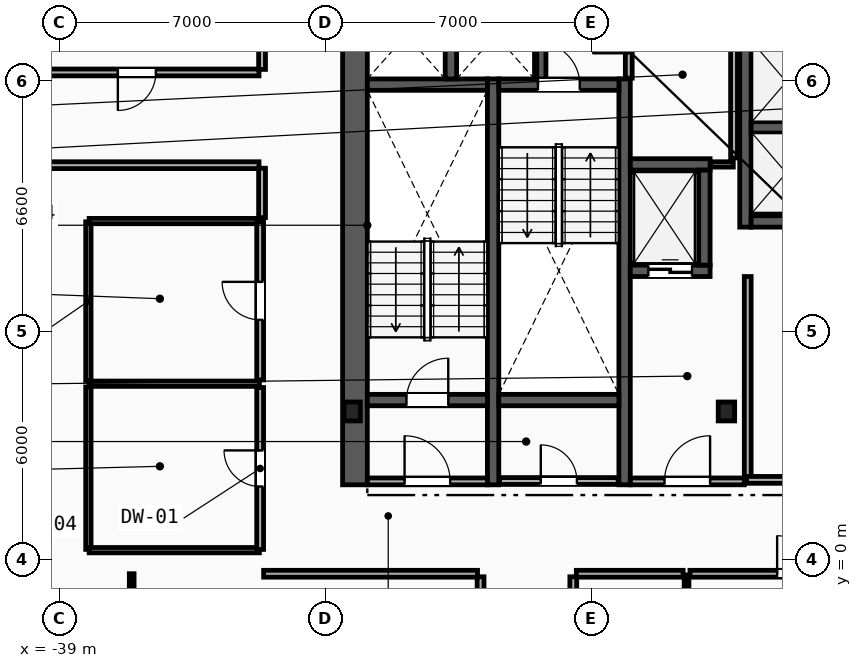
"""IFC4 building model, lengths in metres.
Left out: names, types, materials, properties, quantities, classifications, styles, units other than length and angle.
Written with IfcOpenShell. Run it as: python <this file> out.ifc"""

import sys

from ifc_helpers import new_model, si_unit, direction, frame, frame_2d, origin, origin_2d, place, context, subcontext, project, spatial, rectangle, i_section, extrude, element, fill, save


model = new_model("IFC4")
c1 = context("Model", 3, precision=1e-05, world=origin(), true_north=direction((0.0, 1.0)))
c2 = subcontext(c1, "Body", "Model", "MODEL_VIEW")
j1 = project(units=[si_unit("LENGTHUNIT", "METRE"), si_unit("PLANEANGLEUNIT", "RADIAN")], contexts=[c1])
p1 = place(None, origin())
s1 = spatial("IfcSite", under=j1, at=p1, CompositionType="ELEMENT")
p2 = place(p1, origin())
s2 = spatial("IfcBuilding", under=s1, at=p2, CompositionType="ELEMENT")
p3 = place(p2, frame((0.0, 0.0, 140.4)))
s3 = spatial("IfcBuildingStorey", under=s2, at=p3, CompositionType="ELEMENT", Elevation=140.4)
for number, where, z_axis, x_axis in (
    (1, (-31.3, 3.9, 0.0), (0.0, 0.0, 1.0), (1.0, 0.0, 0.0)),
    (2, (-21.45, 3.9, 0.0), (0.0, 0.0, 1.0), (1.0, 0.0, 0.0)),
):
    element("IfcColumn", number, at=place(p3, frame(where, z_axis=z_axis, x_axis=x_axis)), inside=s3, PredefinedType="COLUMN", context=c2, shape_type="SweptSolid", body=[
        extrude(i_section(OverallWidth=0.432, OverallDepth=0.498, WebThickness=0.056, FlangeThickness=0.089, FilletRadius=0.018, at=origin_2d()), origin(), (0.0, 0.0, 1.0), 3.6),
    ])
p4 = place(p3, frame((-31.225, 1.97, 0.0), z_axis=(0.0, 0.0, 1.0), x_axis=(0.0, 1.0, 0.0)))
e3 = element("IfcWall", 3, at=p4, inside=s3, PredefinedType="SHEAR", context=c2, shape_type="SweptSolid", body=[
    extrude(rectangle(XDim=13.33, YDim=0.65, at=frame_2d((6.665, 0.0))), origin(), (0.0, 0.0, 1.0), 3.36),
])
for number, where, z_axis, x_axis in (
    (4, (-27.59, 1.97, 0.0), (0.0, 0.0, 1.0), (0.0, 1.0, 0.0)),
    (5, (-24.13, 1.97, 0.0), (0.0, 0.0, 1.0), (0.0, 1.0, 0.0)),
):
    element("IfcWall", number, at=place(p3, frame(where, z_axis=z_axis, x_axis=x_axis)), inside=s3, PredefinedType="SHEAR", context=c2, shape_type="SweptSolid", body=[
        extrude(rectangle(XDim=10.68, YDim=0.3, at=frame_2d((5.34, 0.0))), origin(), (0.0, 0.0, 1.0), 3.36),
    ])
p5 = place(p3, frame((-30.9, 4.2, 0.0), z_axis=(0.0, 0.0, 1.0), x_axis=(1.0, 0.0, 0.0)))
e6 = element("IfcWall", 6, at=p5, inside=s3, PredefinedType="SHEAR", context=c2, shape_type="SweptSolid", body=[
    extrude(rectangle(XDim=3.16, YDim=0.3, at=frame_2d((1.58, 0.0))), origin(), (0.0, 0.0, 1.0), 3.36),
])
p6 = place(p5, frame((1.03, 0.0, 0.0)))
e7 = element("IfcOpeningElement", 7, at=p6, cuts=e6, PredefinedType="OPENING", context=c2, shape_type="SweptSolid", body=[
    extrude(rectangle(XDim=1.1, YDim=2.15, at=frame_2d((0.55, 1.075))), frame((0.0, 0.16, 0.0), z_axis=(0.0, -1.0, 0.0), x_axis=(1.0, 0.0, 0.0)), (0.0, 0.0, 1.0), 0.32),
])
p7 = place(p3, frame((-30.9, 12.5, 0.0), z_axis=(0.0, 0.0, 1.0), x_axis=(1.0, 0.0, 0.0)))
e8 = element("IfcWall", 8, at=p7, inside=s3, PredefinedType="SHEAR", context=c2, shape_type="SweptSolid", body=[
    extrude(rectangle(XDim=3.16, YDim=0.3, at=frame_2d((1.58, 0.0))), origin(), (0.0, 0.0, 1.0), 3.36),
])
p8 = place(p3, frame((-27.44, 12.5, 0.0), z_axis=(0.0, 0.0, 1.0), x_axis=(1.0, 0.0, 0.0)))
e9 = element("IfcWall", 9, at=p8, inside=s3, PredefinedType="SHEAR", context=c2, shape_type="SweptSolid", body=[
    extrude(rectangle(XDim=3.16, YDim=0.3, at=frame_2d((1.58, 0.0))), origin(), (0.0, 0.0, 1.0), 3.36),
])
p9 = place(p8, frame((1.03, 0.0, 0.0)))
e10 = element("IfcOpeningElement", 10, at=p9, cuts=e9, PredefinedType="OPENING", context=c2, shape_type="SweptSolid", body=[
    extrude(rectangle(XDim=1.1, YDim=2.15, at=frame_2d((0.55, 1.075))), frame((0.0, 0.16, 0.0), z_axis=(0.0, -1.0, 0.0), x_axis=(1.0, 0.0, 0.0)), (0.0, 0.0, 1.0), 0.32),
])
p10 = place(p3, frame((-27.44, 4.2, 0.0), z_axis=(0.0, 0.0, 1.0), x_axis=(1.0, 0.0, 0.0)))
e11 = element("IfcWall", 11, at=p10, inside=s3, PredefinedType="SHEAR", context=c2, shape_type="SweptSolid", body=[
    extrude(rectangle(XDim=3.16, YDim=0.3, at=frame_2d((1.58, 0.0))), origin(), (0.0, 0.0, 1.0), 3.36),
])
p11 = place(p3, frame((-20.89, 2.15, 0.0), z_axis=(0.0, 0.0, 1.0), x_axis=(0.0, 1.0, 0.0)))
e12 = element("IfcWall", 12, at=p11, inside=s3, PredefinedType="PARTITIONING", context=c2, shape_type="SweptSolid", body=[
    extrude(rectangle(XDim=5.3, YDim=0.18, at=frame_2d((2.65, 0.0))), origin(), (0.0, 0.0, 1.0), 3.36),
])
p12 = place(p3, frame((-23.98, 2.06, 0.0), z_axis=(0.0, 0.0, 1.0), x_axis=(1.0, 0.0, 0.0)))
e13 = element("IfcWall", 13, at=p12, inside=s3, PredefinedType="PARTITIONING", context=c2, shape_type="SweptSolid", body=[
    extrude(rectangle(XDim=3.0, YDim=0.18, at=frame_2d((1.5, 0.0))), origin(), (0.0, 0.0, 1.0), 3.36),
])
p13 = place(p12, frame((0.9, 0.0, 0.0)))
e14 = element("IfcOpeningElement", 14, at=p13, cuts=e13, PredefinedType="OPENING", context=c2, shape_type="SweptSolid", body=[
    extrude(rectangle(XDim=1.2, YDim=2.15, at=frame_2d((0.6, 1.075))), frame((0.0, 0.1, 0.0), z_axis=(0.0, -1.0, 0.0), x_axis=(1.0, 0.0, 0.0)), (0.0, 0.0, 1.0), 0.2),
])
p14 = place(p3, frame((-30.9, 2.06, 0.0), z_axis=(0.0, 0.0, 1.0), x_axis=(1.0, 0.0, 0.0)))
e15 = element("IfcWall", 15, at=p14, inside=s3, PredefinedType="PARTITIONING", context=c2, shape_type="SweptSolid", body=[
    extrude(rectangle(XDim=3.16, YDim=0.18, at=frame_2d((1.58, 0.0))), origin(), (0.0, 0.0, 1.0), 3.36),
])
p15 = place(p14, frame((0.98, 0.0, 0.0)))
e16 = element("IfcOpeningElement", 16, at=p15, cuts=e15, PredefinedType="OPENING", context=c2, shape_type="SweptSolid", body=[
    extrude(rectangle(XDim=1.2, YDim=2.15, at=frame_2d((0.6, 1.075))), frame((0.0, 0.1, 0.0), z_axis=(0.0, -1.0, 0.0), x_axis=(1.0, 0.0, 0.0)), (0.0, 0.0, 1.0), 0.2),
])
p16 = place(p3, frame((-23.98, 7.6, 0.0), z_axis=(0.0, 0.0, 1.0), x_axis=(1.0, 0.0, 0.0)))
e17 = element("IfcWall", 17, at=p16, inside=s3, PredefinedType="SHEAR", context=c2, shape_type="SweptSolid", body=[
    extrude(rectangle(XDim=2.1, YDim=0.3, at=frame_2d((1.05, 0.0))), origin(), (0.0, 0.0, 1.0), 3.36),
])
p17 = place(p16, frame((0.475, 0.0, 0.0)))
e18 = element("IfcOpeningElement", 18, at=p17, cuts=e17, PredefinedType="OPENING", context=c2, shape_type="SweptSolid", body=[
    extrude(rectangle(XDim=1.15, YDim=2.2, at=frame_2d((0.575, 1.1))), frame((0.0, 0.16, 0.0), z_axis=(0.0, -1.0, 0.0), x_axis=(1.0, 0.0, 0.0)), (0.0, 0.0, 1.0), 0.32),
])
p18 = place(p3, frame((-23.98, 10.4, 0.0), z_axis=(0.0, 0.0, 1.0), x_axis=(1.0, 0.0, 0.0)))
e19 = element("IfcWall", 19, at=p18, inside=s3, PredefinedType="SHEAR", context=c2, shape_type="SweptSolid", body=[
    extrude(rectangle(XDim=2.1, YDim=0.3, at=frame_2d((1.05, 0.0))), origin(), (0.0, 0.0, 1.0), 3.36),
])
p19 = place(p3, frame((-22.03, 7.75, 0.0), z_axis=(0.0, 0.0, 1.0), x_axis=(0.0, 1.0, 0.0)))
e20 = element("IfcWall", 20, at=p19, inside=s3, PredefinedType="SHEAR", context=c2, shape_type="SweptSolid", body=[
    extrude(rectangle(XDim=2.5, YDim=0.3, at=frame_2d((1.25, 0.0))), origin(), (0.0, 0.0, 1.0), 3.36),
])
for number, where, z_axis, x_axis in (
    (21, (-28.7, 12.65, 0.0), (0.0, 0.0, 1.0), (0.0, 1.0, 0.0)),
    (22, (-26.35, 12.65, 0.0), (0.0, 0.0, 1.0), (0.0, 1.0, 0.0)),
):
    element("IfcWall", number, at=place(p3, frame(where, z_axis=z_axis, x_axis=x_axis)), inside=s3, PredefinedType="SHEAR", context=c2, shape_type="SweptSolid", body=[
        extrude(rectangle(XDim=2.3, YDim=0.3, at=frame_2d((1.15, 0.0))), origin(), (0.0, 0.0, 1.0), 3.36),
    ])
p20 = place(p3, frame((-20.95, 8.75, 0.0), z_axis=(0.0, 0.0, 1.0), x_axis=(0.0, 1.0, 0.0)))
e23 = element("IfcWall", 23, at=p20, inside=s3, PredefinedType="SHEAR", context=c2, shape_type="SweptSolid", body=[
    extrude(rectangle(XDim=5.25, YDim=0.3, at=frame_2d((2.625, 0.0))), origin(), (0.0, 0.0, 1.0), 3.36),
])
p21 = place(p3, frame((-20.8, 8.9, 0.0), z_axis=(0.0, 0.0, 1.0), x_axis=(1.0, 0.0, 0.0)))
e24 = element("IfcWall", 24, at=p21, inside=s3, PredefinedType="SHEAR", context=c2, shape_type="SweptSolid", body=[
    extrude(rectangle(XDim=2.15, YDim=0.3, at=frame_2d((1.075, 0.0))), origin(), (0.0, 0.0, 1.0), 3.36),
])
p22 = place(p3, frame((-20.8, 11.375, 0.0), z_axis=(0.0, 0.0, 1.0), x_axis=(1.0, 0.0, 0.0)))
e25 = element("IfcWall", 25, at=p22, inside=s3, PredefinedType="SHEAR", context=c2, shape_type="SweptSolid", body=[
    extrude(rectangle(XDim=1.85, YDim=0.3, at=frame_2d((0.925, 0.0))), origin(), (0.0, 0.0, 1.0), 3.36),
])
p23 = place(p3, frame((-21.86, 10.4, 0.0), z_axis=(0.0, 0.0, 1.0), x_axis=(1.0, 0.0, 0.0)))
e26 = element("IfcWall", 26, at=p23, inside=s3, PredefinedType="PARTITIONING", context=c2, shape_type="SweptSolid", body=[
    extrude(rectangle(XDim=0.59, YDim=0.14, at=frame_2d((0.295, 0.0))), origin(), (0.0, 0.0, 1.0), 3.36),
])
p24 = place(p3, frame((-21.25, 10.57, 0.0), z_axis=(0.0, 0.0, 1.0), x_axis=(0.0, 1.0, 0.0)))
e27 = element("IfcWall", 27, at=p24, inside=s3, PredefinedType="PARTITIONING", context=c2, shape_type="SweptSolid", body=[
    extrude(rectangle(XDim=4.36, YDim=0.18, at=frame_2d((2.18, 0.0))), origin(), (0.0, 0.0, 1.0), 3.36),
])
p25 = place(p3, frame((-27.42, 2.07, 0.0), z_axis=(0.0, 0.0, 1.0), x_axis=(1.0, 0.0, 0.0)))
e28 = element("IfcWall", 28, at=p25, inside=s3, PredefinedType="PARTITIONING", context=c2, shape_type="SweptSolid", body=[
    extrude(rectangle(XDim=3.12, YDim=0.18, at=frame_2d((1.56, 0.0))), origin(), (0.0, 0.0, 1.0), 3.36),
])
p26 = place(p25, frame((1.085, 0.0, 0.0)))
e29 = element("IfcOpeningElement", 29, at=p26, cuts=e28, PredefinedType="OPENING", context=c2, shape_type="SweptSolid", body=[
    extrude(rectangle(XDim=0.95, YDim=2.1, at=frame_2d((0.475, 1.05))), frame((0.0, 0.1, 0.0), z_axis=(0.0, -1.0, 0.0), x_axis=(1.0, 0.0, 0.0)), (0.0, 0.0, 1.0), 0.2),
])
p27 = place(p3, frame((-24.02, 12.67, 0.0), z_axis=(0.0, 0.0, 1.0), x_axis=(0.0, 1.0, 0.0)))
e30 = element("IfcWall", 30, at=p27, inside=s3, PredefinedType="PARTITIONING", context=c2, shape_type="SweptSolid", body=[
    extrude(rectangle(XDim=2.26, YDim=0.18, at=frame_2d((1.13, 0.0))), origin(), (0.0, 0.0, 1.0), 3.36),
])
p28 = place(p27, frame((0.655, 0.0, 0.0)))
e31 = element("IfcOpeningElement", 31, at=p28, cuts=e30, PredefinedType="OPENING", context=c2, shape_type="SweptSolid", body=[
    extrude(rectangle(XDim=0.95, YDim=2.1, at=frame_2d((0.475, 1.05))), frame((0.0, 0.1, 0.0), z_axis=(0.0, -1.0, 0.0), x_axis=(1.0, 0.0, 0.0)), (0.0, 0.0, 1.0), 0.2),
])
p29 = place(p3, frame((-38.24, 0.27, 0.0), z_axis=(0.0, 0.0, 1.0), x_axis=(0.0, 1.0, 0.0)))
e32 = element("IfcWall", 32, at=p29, inside=s3, PredefinedType="PARTITIONING", context=c2, shape_type="SweptSolid", body=[
    extrude(rectangle(XDim=4.275, YDim=0.14, at=frame_2d((2.137, 0.0))), origin(), (0.0, 0.0, 1.0), 3.36),
])
p30 = place(p3, frame((-38.24, 4.715, 0.0), z_axis=(0.0, 0.0, 1.0), x_axis=(0.0, 1.0, 0.0)))
e33 = element("IfcWall", 33, at=p30, inside=s3, PredefinedType="PARTITIONING", context=c2, shape_type="SweptSolid", body=[
    extrude(rectangle(XDim=4.175, YDim=0.14, at=frame_2d((2.087, 0.0))), origin(), (0.0, 0.0, 1.0), 3.36),
])
for number, where, z_axis, x_axis in (
    (34, (-38.22, 0.25, 0.0), (0.0, 0.0, 1.0), (1.0, 0.0, 0.0)),
    (35, (-38.22, 4.63, 0.0), (0.0, 0.0, 1.0), (1.0, 0.0, 0.0)),
    (36, (-38.22, 8.91, 0.0), (0.0, 0.0, 1.0), (1.0, 0.0, 0.0)),
):
    element("IfcWall", number, at=place(p3, frame(where, z_axis=z_axis, x_axis=x_axis)), inside=s3, PredefinedType="PARTITIONING", context=c2, shape_type="SweptSolid", body=[
        extrude(rectangle(XDim=4.48, YDim=0.14, at=frame_2d((2.24, 0.0))), origin(), (0.0, 0.0, 1.0), 3.36),
    ])
p31 = place(p3, frame((-33.72, 0.27, 0.0), z_axis=(0.0, 0.0, 1.0), x_axis=(0.0, 1.0, 0.0)))
e37 = element("IfcWall", 37, at=p31, inside=s3, PredefinedType="PARTITIONING", context=c2, shape_type="SweptSolid", body=[
    extrude(rectangle(XDim=4.26, YDim=0.18, at=frame_2d((2.13, 0.0))), origin(), (0.0, 0.0, 1.0), 3.36),
])
p32 = place(p31, frame((1.655, 0.0, 0.0)))
e38 = element("IfcOpeningElement", 38, at=p32, cuts=e37, PredefinedType="OPENING", context=c2, shape_type="SweptSolid", body=[
    extrude(rectangle(XDim=0.95, YDim=2.1, at=frame_2d((0.475, 1.05))), frame((0.0, 0.1, 0.0), z_axis=(0.0, -1.0, 0.0), x_axis=(1.0, 0.0, 0.0)), (0.0, 0.0, 1.0), 0.2),
])
p33 = place(p3, frame((-33.72, 4.73, 0.0), z_axis=(0.0, 0.0, 1.0), x_axis=(0.0, 1.0, 0.0)))
e39 = element("IfcWall", 39, at=p33, inside=s3, PredefinedType="PARTITIONING", context=c2, shape_type="SweptSolid", body=[
    extrude(rectangle(XDim=4.16, YDim=0.18, at=frame_2d((2.08, 0.0))), origin(), (0.0, 0.0, 1.0), 3.36),
])
p34 = place(p33, frame((1.58, 0.0, 0.0)))
e40 = element("IfcOpeningElement", 40, at=p34, cuts=e39, PredefinedType="OPENING", context=c2, shape_type="SweptSolid", body=[
    extrude(rectangle(XDim=1.0, YDim=2.15, at=frame_2d((0.5, 1.075))), frame((0.0, 0.1, 0.0), z_axis=(0.0, -1.0, 0.0), x_axis=(1.0, 0.0, 0.0)), (0.0, 0.0, 1.0), 0.2),
])
p35 = place(p3, frame((-37.1, -22.736, 0.0), z_axis=(0.0, 0.0, 1.0), x_axis=(0.0, 1.0, 0.0)))
e41 = element("IfcWall", 41, at=p35, inside=s3, PredefinedType="PARTITIONING", context=c2, shape_type="SweptSolid", body=[
    extrude(rectangle(XDim=22.366, YDim=0.125, at=frame_2d((11.183, 0.0))), origin(), (0.0, 0.0, 1.0), 3.36),
])
p36 = place(p3, frame((-22.5, -20.923, 0.0), z_axis=(0.0, 0.0, 1.0), x_axis=(0.0, 1.0, 0.0)))
e42 = element("IfcWall", 42, at=p36, inside=s3, PredefinedType="PARTITIONING", context=c2, shape_type="SweptSolid", body=[
    extrude(rectangle(XDim=20.523, YDim=0.125, at=frame_2d((10.262, 0.0))), origin(), (0.0, 0.0, 1.0), 2.665),
])
p37 = place(p3, frame((-27.92, -0.45, 0.0), z_axis=(0.0, 0.0, 1.0), x_axis=(0.0, -1.0, 0.0)))
e43 = element("IfcWall", 43, at=p37, inside=s3, PredefinedType="PARTITIONING", context=c2, shape_type="SweptSolid", body=[
    extrude(rectangle(XDim=10.729, YDim=0.18, at=frame_2d((5.364, 0.0))), origin(), (0.0, 0.0, 1.0), 3.36),
])
p38 = place(p37, frame((4.864, 0.0, 0.0)))
e44 = element("IfcOpeningElement", 44, at=p38, cuts=e43, PredefinedType="OPENING", context=c2, shape_type="SweptSolid", body=[
    extrude(rectangle(XDim=1.0, YDim=2.15, at=frame_2d((0.5, 1.075))), frame((0.0, 0.1, 0.0), z_axis=(0.0, -1.0, 0.0), x_axis=(1.0, 0.0, 0.0)), (0.0, 0.0, 1.0), 0.2),
])
p39 = place(p3, frame((-25.48, -11.178, 0.0), z_axis=(0.0, 0.0, 1.0), x_axis=(0.0, 1.0, 0.0)))
e45 = element("IfcWall", 45, at=p39, inside=s3, PredefinedType="PARTITIONING", context=c2, shape_type="SweptSolid", body=[
    extrude(rectangle(XDim=10.729, YDim=0.18, at=frame_2d((5.364, 0.0))), origin(), (0.0, 0.0, 1.0), 3.36),
])
p40 = place(p3, frame((-40.178, 10.38, 0.0), z_axis=(0.0, 0.0, 1.0), x_axis=(1.0, 0.0, 0.0)))
e46 = element("IfcWall", 46, at=p40, inside=s3, PredefinedType="PARTITIONING", context=c2, shape_type="SweptSolid", body=[
    extrude(rectangle(XDim=6.428, YDim=0.18, at=frame_2d((3.214, 0.0))), origin(), (0.0, 0.0, 1.0), 3.36),
])
p41 = place(p3, frame((-33.628, -0.37, 0.0), z_axis=(0.0, 0.0, 1.0), x_axis=(1.0, 0.0, 0.0)))
e47 = element("IfcWall", 47, at=p41, inside=s3, PredefinedType="PARTITIONING", context=c2, shape_type="SweptSolid", body=[
    extrude(rectangle(XDim=5.628, YDim=0.18, at=frame_2d((2.814, 0.0))), origin(), (0.0, 0.0, 1.0), 3.36),
])
p42 = place(p3, frame((-25.4, -0.37, 0.0), z_axis=(0.0, 0.0, 1.0), x_axis=(1.0, 0.0, 0.0)))
e48 = element("IfcWall", 48, at=p42, inside=s3, PredefinedType="PARTITIONING", context=c2, shape_type="SweptSolid", body=[
    extrude(rectangle(XDim=2.81, YDim=0.18, at=frame_2d((1.405, 0.0))), origin(), (0.0, 0.0, 1.0), 3.36),
])
p43 = place(p3, frame((-33.67, 10.3, 0.0), z_axis=(0.0, 0.0, 1.0), x_axis=(0.0, -1.0, 0.0)))
e49 = element("IfcWall", 49, at=p43, inside=s3, PredefinedType="PARTITIONING", context=c2, shape_type="SweptSolid", body=[
    extrude(rectangle(XDim=1.299, YDim=0.18, at=frame_2d((0.649, 0.0))), origin(), (0.0, 0.0, 1.0), 3.36),
])
p44 = place(p3, frame((-22.41, -0.37, 0.0), z_axis=(0.0, 0.0, 1.0), x_axis=(1.0, 0.0, 0.0)))
e50 = element("IfcWall", 50, at=p44, inside=s3, PredefinedType="PARTITIONING", context=c2, shape_type="SweptSolid", body=[
    extrude(rectangle(XDim=5.588, YDim=0.18, at=frame_2d((2.794, 0.0))), origin(), (0.0, 0.0, 1.0), 3.36),
])
p45 = place(p44, frame((2.294, 0.0, 0.0)))
e51 = element("IfcOpeningElement", 51, at=p45, cuts=e50, PredefinedType="OPENING", context=c2, shape_type="SweptSolid", body=[
    extrude(rectangle(XDim=1.0, YDim=2.15, at=frame_2d((0.5, 1.075))), frame((0.0, 0.1, 0.0), z_axis=(0.0, -1.0, 0.0), x_axis=(1.0, 0.0, 0.0)), (0.0, 0.0, 1.0), 0.2),
])
p46 = place(p3, frame((-16.822, 2.1, 0.0), z_axis=(0.0, 0.0, 1.0), x_axis=(-1.0, 0.0, 0.0)))
e52 = element("IfcWall", 52, at=p46, inside=s3, PredefinedType="PARTITIONING", context=c2, shape_type="SweptSolid", body=[
    extrude(rectangle(XDim=4.098, YDim=0.18, at=frame_2d((2.049, 0.0))), origin(), (0.0, 0.0, 1.0), 3.36),
])
p47 = place(p3, frame((-33.75, 12.82, 0.0), z_axis=(0.0, 0.0, 1.0), x_axis=(-1.0, 0.0, 0.0)))
e53 = element("IfcWall", 53, at=p47, inside=s3, PredefinedType="PARTITIONING", context=c2, shape_type="SweptSolid", body=[
    extrude(rectangle(XDim=6.428, YDim=0.18, at=frame_2d((3.214, 0.0))), origin(), (0.0, 0.0, 1.0), 3.36),
])
p48 = place(p47, frame((2.714, 0.0, 0.0)))
e54 = element("IfcOpeningElement", 54, at=p48, cuts=e53, PredefinedType="OPENING", context=c2, shape_type="SweptSolid", body=[
    extrude(rectangle(XDim=1.0, YDim=2.15, at=frame_2d((0.5, 1.075))), frame((0.0, 0.1, 0.0), z_axis=(0.0, -1.0, 0.0), x_axis=(1.0, 0.0, 0.0)), (0.0, 0.0, 1.0), 0.2),
])
p49 = place(p3, frame((-33.67, 17.428, 0.0), z_axis=(0.0, 0.0, 1.0), x_axis=(0.0, -1.0, 0.0)))
e55 = element("IfcWall", 55, at=p49, inside=s3, PredefinedType="PARTITIONING", context=c2, shape_type="SweptSolid", body=[
    extrude(rectangle(XDim=4.529, YDim=0.18, at=frame_2d((2.264, 0.0))), origin(), (0.0, 0.0, 1.0), 3.36),
])
p50 = place(p6, origin())
e56 = element("IfcDoor", 56, at=p50, inside=s3, OperationType="SINGLE_SWING_RIGHT", PredefinedType="DOOR", context=c2, shape_type="SweptSolid", body=[
    extrude(rectangle(XDim=1.1, YDim=2.15, at=frame_2d((0.55, 1.075))), frame((0.0, 0.025, 0.0), z_axis=(0.0, -1.0, 0.0), x_axis=(1.0, 0.0, 0.0)), (0.0, 0.0, 1.0), 0.05),
])
fill(e7, e56)
p51 = place(p9, origin())
e57 = element("IfcDoor", 57, at=p51, inside=s3, OperationType="SINGLE_SWING_LEFT", PredefinedType="DOOR", context=c2, shape_type="SweptSolid", body=[
    extrude(rectangle(XDim=1.1, YDim=2.15, at=frame_2d((0.55, 1.075))), frame((0.0, 0.025, 0.0), z_axis=(0.0, -1.0, 0.0), x_axis=(1.0, 0.0, 0.0)), (0.0, 0.0, 1.0), 0.05),
])
fill(e10, e57)
p52 = place(p13, origin())
e58 = element("IfcDoor", 58, at=p52, inside=s3, OperationType="SINGLE_SWING_RIGHT", PredefinedType="DOOR", context=c2, shape_type="SweptSolid", body=[
    extrude(rectangle(XDim=1.2, YDim=2.15, at=frame_2d((0.6, 1.075))), frame((0.0, 0.025, 0.0), z_axis=(0.0, -1.0, 0.0), x_axis=(1.0, 0.0, 0.0)), (0.0, 0.0, 1.0), 0.05),
])
fill(e14, e58)
p53 = place(p15, origin())
e59 = element("IfcDoor", 59, at=p53, inside=s3, OperationType="SINGLE_SWING_LEFT", PredefinedType="DOOR", context=c2, shape_type="SweptSolid", body=[
    extrude(rectangle(XDim=1.2, YDim=2.15, at=frame_2d((0.6, 1.075))), frame((0.0, 0.025, 0.0), z_axis=(0.0, -1.0, 0.0), x_axis=(1.0, 0.0, 0.0)), (0.0, 0.0, 1.0), 0.05),
])
fill(e16, e59)
p54 = place(p17, origin())
e60 = element("IfcDoor", 60, at=p54, inside=s3, OperationType="SLIDING_TO_LEFT", PredefinedType="TRAPDOOR", context=c2, shape_type="SweptSolid", body=[
    extrude(rectangle(XDim=1.15, YDim=2.2, at=frame_2d((0.575, 1.1))), frame((0.0, 0.025, 0.0), z_axis=(0.0, -1.0, 0.0), x_axis=(1.0, 0.0, 0.0)), (0.0, 0.0, 1.0), 0.05),
])
fill(e18, e60)
p55 = place(p48, origin())
e61 = element("IfcDoor", 61, at=p55, inside=s3, OperationType="SINGLE_SWING_RIGHT", PredefinedType="DOOR", context=c2, shape_type="SweptSolid", body=[
    extrude(rectangle(XDim=1.0, YDim=2.15, at=frame_2d((0.5, 1.075))), frame((0.0, 0.025, 0.0), z_axis=(0.0, -1.0, 0.0), x_axis=(1.0, 0.0, 0.0)), (0.0, 0.0, 1.0), 0.05),
])
fill(e54, e61)
p56 = place(p45, origin())
e62 = element("IfcDoor", 62, at=p56, inside=s3, OperationType="SINGLE_SWING_LEFT", PredefinedType="DOOR", context=c2, shape_type="SweptSolid", body=[
    extrude(rectangle(XDim=1.0, YDim=2.15, at=frame_2d((0.5, 1.075))), frame((0.0, 0.025, 0.0), z_axis=(0.0, -1.0, 0.0), x_axis=(1.0, 0.0, 0.0)), (0.0, 0.0, 1.0), 0.05),
])
fill(e51, e62)
p57 = place(p32, origin())
e63 = element("IfcDoor", 63, at=p57, inside=s3, OperationType="SINGLE_SWING_RIGHT", PredefinedType="DOOR", context=c2, shape_type="SweptSolid", body=[
    extrude(rectangle(XDim=0.95, YDim=2.1, at=frame_2d((0.475, 1.05))), frame((0.0, 0.025, 0.0), z_axis=(0.0, -1.0, 0.0), x_axis=(1.0, 0.0, 0.0)), (0.0, 0.0, 1.0), 0.05),
])
fill(e38, e63)
p58 = place(p34, origin())
e64 = element("IfcDoor", 64, at=p58, inside=s3, OperationType="SINGLE_SWING_RIGHT", PredefinedType="DOOR", context=c2, shape_type="SweptSolid", body=[
    extrude(rectangle(XDim=1.0, YDim=2.15, at=frame_2d((0.5, 1.075))), frame((0.0, 0.025, 0.0), z_axis=(0.0, -1.0, 0.0), x_axis=(1.0, 0.0, 0.0)), (0.0, 0.0, 1.0), 0.05),
])
fill(e40, e64)
p59 = place(p26, origin())
e65 = element("IfcDoor", 65, at=p59, inside=s3, OperationType="SINGLE_SWING_LEFT", PredefinedType="DOOR", context=c2, shape_type="SweptSolid", body=[
    extrude(rectangle(XDim=0.95, YDim=2.1, at=frame_2d((0.475, 1.05))), frame((0.0, 0.025, 0.0), z_axis=(0.0, -1.0, 0.0), x_axis=(1.0, 0.0, 0.0)), (0.0, 0.0, 1.0), 0.05),
])
fill(e29, e65)
p60 = place(p28, origin())
e66 = element("IfcDoor", 66, at=p60, inside=s3, OperationType="SINGLE_SWING_LEFT", PredefinedType="DOOR", context=c2, shape_type="SweptSolid", body=[
    extrude(rectangle(XDim=0.95, YDim=2.1, at=frame_2d((0.475, 1.05))), frame((0.0, 0.025, 0.0), z_axis=(0.0, -1.0, 0.0), x_axis=(1.0, 0.0, 0.0)), (0.0, 0.0, 1.0), 0.05),
])
fill(e31, e66)
save(model, sys.argv[1])
